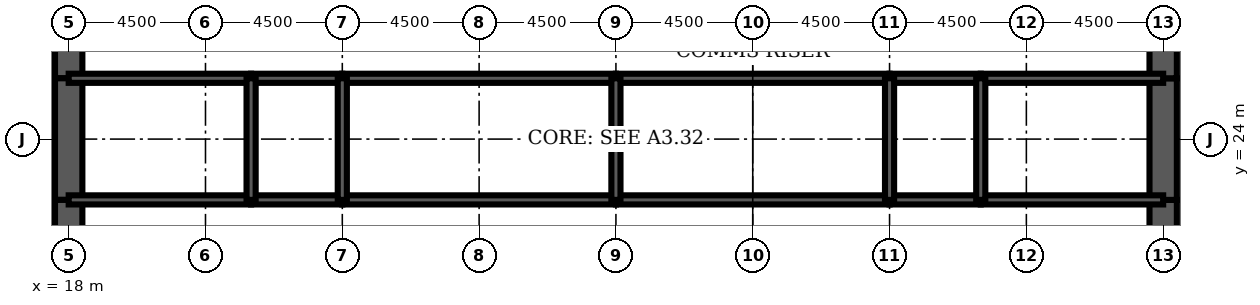
"""IFC4 building model, lengths in metres.
Left out: names, types, materials, properties, quantities, classifications, styles, units other than length and angle.
Written with IfcOpenShell. Run it as: python <this file> out.ifc"""

import sys

from ifc_helpers import new_model, si_unit, direction, frame, frame_2d, origin, place, context, subcontext, project, spatial, rectangle, extrude, element, fill, save


model = new_model("IFC4")
c1 = context("Model", 3, precision=1e-05, world=origin(), true_north=direction((0.0, 1.0)))
c2 = subcontext(c1, "Body", "Model", "MODEL_VIEW")
j1 = project(units=[si_unit("LENGTHUNIT", "METRE"), si_unit("PLANEANGLEUNIT", "RADIAN")], contexts=[c1])
p1 = place(None, origin())
s1 = spatial("IfcSite", under=j1, at=p1, CompositionType="ELEMENT")
p2 = place(p1, origin())
s2 = spatial("IfcBuilding", under=s1, at=p2, CompositionType="ELEMENT")
p3 = place(p2, frame((0.0, 0.0, 138.3)))
s3 = spatial("IfcBuildingStorey", under=s2, at=p3, CompositionType="ELEMENT", Elevation=138.3)
p4 = place(p3, frame((18.0, 28.8, 0.0), z_axis=(0.0, 0.0, 1.0), x_axis=(0.0, -1.0, 0.0)))
e1 = element("IfcWall", 1, at=p4, inside=s3, PredefinedType="SHEAR", context=c2, shape_type="SweptSolid", body=[
    extrude(rectangle(XDim=2.8, YDim=0.9, at=frame_2d((1.4, 0.0))), origin(), (0.0, 0.0, 1.0), 4.2),
])
p5 = place(p4, frame((0.4, 0.0, 0.0)))
e2 = element("IfcOpeningElement", 2, at=p5, cuts=e1, PredefinedType="OPENING", context=c2, shape_type="SweptSolid", body=[
    extrude(rectangle(XDim=1.8, YDim=2.1, at=frame_2d((0.9, 1.05))), frame((0.0, 0.46, 0.0), z_axis=(0.0, -1.0, 0.0), x_axis=(1.0, 0.0, 0.0)), (0.0, 0.0, 1.0), 0.92),
])
p6 = place(p3, frame((18.0, 26.0, 0.0), z_axis=(0.0, 0.0, 1.0), x_axis=(0.0, -1.0, 0.0)))
e3 = element("IfcWall", 3, at=p6, inside=s3, PredefinedType="SHEAR", context=c2, shape_type="SweptSolid", body=[
    extrude(rectangle(XDim=4.0, YDim=0.9, at=frame_2d((2.0, 0.0))), origin(), (0.0, 0.0, 1.0), 4.2),
])
p7 = place(p3, frame((18.0, 22.0, 0.0), z_axis=(0.0, 0.0, 1.0), x_axis=(0.0, -1.0, 0.0)))
e4 = element("IfcWall", 4, at=p7, inside=s3, PredefinedType="SHEAR", context=c2, shape_type="SweptSolid", body=[
    extrude(rectangle(XDim=2.8, YDim=0.9, at=frame_2d((1.4, 0.0))), origin(), (0.0, 0.0, 1.0), 4.2),
])
p8 = place(p7, frame((0.6, 0.0, 0.0)))
e5 = element("IfcOpeningElement", 5, at=p8, cuts=e4, PredefinedType="OPENING", context=c2, shape_type="SweptSolid", body=[
    extrude(rectangle(XDim=1.8, YDim=2.1, at=frame_2d((0.9, 1.05))), frame((0.0, 0.46, 0.0), z_axis=(0.0, -1.0, 0.0), x_axis=(1.0, 0.0, 0.0)), (0.0, 0.0, 1.0), 0.92),
])
p9 = place(p3, frame((54.0, 19.2, 0.0), z_axis=(0.0, 0.0, 1.0), x_axis=(0.0, 1.0, 0.0)))
e6 = element("IfcWall", 6, at=p9, inside=s3, PredefinedType="SHEAR", context=c2, shape_type="SweptSolid", body=[
    extrude(rectangle(XDim=2.8, YDim=0.9, at=frame_2d((1.4, 0.0))), origin(), (0.0, 0.0, 1.0), 4.2),
])
p10 = place(p9, frame((0.4, 0.0, 0.0)))
e7 = element("IfcOpeningElement", 7, at=p10, cuts=e6, PredefinedType="OPENING", context=c2, shape_type="SweptSolid", body=[
    extrude(rectangle(XDim=1.8, YDim=2.1, at=frame_2d((0.9, 1.05))), frame((0.0, 0.46, 0.0), z_axis=(0.0, -1.0, 0.0), x_axis=(1.0, 0.0, 0.0)), (0.0, 0.0, 1.0), 0.92),
])
p11 = place(p3, frame((54.0, 22.0, 0.0), z_axis=(0.0, 0.0, 1.0), x_axis=(0.0, 1.0, 0.0)))
e8 = element("IfcWall", 8, at=p11, inside=s3, PredefinedType="SHEAR", context=c2, shape_type="SweptSolid", body=[
    extrude(rectangle(XDim=4.0, YDim=0.9, at=frame_2d((2.0, 0.0))), origin(), (0.0, 0.0, 1.0), 4.2),
])
p12 = place(p3, frame((54.0, 26.0, 0.0), z_axis=(0.0, 0.0, 1.0), x_axis=(0.0, 1.0, 0.0)))
e9 = element("IfcWall", 9, at=p12, inside=s3, PredefinedType="SHEAR", context=c2, shape_type="SweptSolid", body=[
    extrude(rectangle(XDim=2.8, YDim=0.9, at=frame_2d((1.4, 0.0))), origin(), (0.0, 0.0, 1.0), 4.2),
])
p13 = place(p12, frame((0.6, 0.0, 0.0)))
e10 = element("IfcOpeningElement", 10, at=p13, cuts=e9, PredefinedType="OPENING", context=c2, shape_type="SweptSolid", body=[
    extrude(rectangle(XDim=1.8, YDim=2.1, at=frame_2d((0.9, 1.05))), frame((0.0, 0.46, 0.0), z_axis=(0.0, -1.0, 0.0), x_axis=(1.0, 0.0, 0.0)), (0.0, 0.0, 1.0), 0.92),
])
p14 = place(p3, frame((18.0, 22.0, 0.0), z_axis=(0.0, 0.0, 1.0), x_axis=(1.0, 0.0, 0.0)))
e11 = element("IfcWall", 11, at=p14, inside=s3, PredefinedType="SOLIDWALL", context=c2, shape_type="SweptSolid", body=[
    extrude(rectangle(XDim=6.0, YDim=0.3, at=frame_2d((3.0, 0.0))), origin(), (0.0, 0.0, 1.0), 4.2),
])
p15 = place(p14, frame((4.4, 0.0, 0.0)))
e12 = element("IfcOpeningElement", 12, at=p15, cuts=e11, PredefinedType="OPENING", context=c2, shape_type="SweptSolid", body=[
    extrude(rectangle(XDim=1.0, YDim=2.1, at=frame_2d((0.5, 1.05))), frame((0.0, 0.16, 0.0), z_axis=(0.0, -1.0, 0.0), x_axis=(1.0, 0.0, 0.0)), (0.0, 0.0, 1.0), 0.32),
])
p16 = place(p14, frame((1.0, 0.0, 0.0)))
e13 = element("IfcOpeningElement", 13, at=p16, cuts=e11, PredefinedType="OPENING", context=c2, shape_type="SweptSolid", body=[
    extrude(rectangle(XDim=1.0, YDim=2.1, at=frame_2d((0.5, 1.05))), frame((0.0, 0.16, 0.0), z_axis=(0.0, -1.0, 0.0), x_axis=(1.0, 0.0, 0.0)), (0.0, 0.0, 1.0), 0.32),
])
p17 = place(p3, frame((24.0, 22.0, 0.0), z_axis=(0.0, 0.0, 1.0), x_axis=(1.0, 0.0, 0.0)))
e14 = element("IfcWall", 14, at=p17, inside=s3, PredefinedType="SOLIDWALL", context=c2, shape_type="SweptSolid", body=[
    extrude(rectangle(XDim=3.0, YDim=0.3, at=frame_2d((1.5, 0.0))), origin(), (0.0, 0.0, 1.0), 4.2),
])
p18 = place(p17, frame((1.0, 0.0, 0.0)))
e15 = element("IfcOpeningElement", 15, at=p18, cuts=e14, PredefinedType="OPENING", context=c2, shape_type="SweptSolid", body=[
    extrude(rectangle(XDim=1.0, YDim=2.1, at=frame_2d((0.5, 1.05))), frame((0.0, 0.16, 0.0), z_axis=(0.0, -1.0, 0.0), x_axis=(1.0, 0.0, 0.0)), (0.0, 0.0, 1.0), 0.32),
])
p19 = place(p3, frame((27.0, 22.0, 0.0), z_axis=(0.0, 0.0, 1.0), x_axis=(1.0, 0.0, 0.0)))
e16 = element("IfcWall", 16, at=p19, inside=s3, PredefinedType="SOLIDWALL", context=c2, shape_type="SweptSolid", body=[
    extrude(rectangle(XDim=9.0, YDim=0.3, at=frame_2d((4.5, 0.0))), origin(), (0.0, 0.0, 1.0), 4.2),
])
p20 = place(p19, frame((4.0, 0.0, 0.0)))
e17 = element("IfcOpeningElement", 17, at=p20, cuts=e16, PredefinedType="OPENING", context=c2, shape_type="SweptSolid", body=[
    extrude(rectangle(XDim=1.0, YDim=2.1, at=frame_2d((0.5, 1.05))), frame((0.0, 0.16, 0.0), z_axis=(0.0, -1.0, 0.0), x_axis=(1.0, 0.0, 0.0)), (0.0, 0.0, 1.0), 0.32),
])
p21 = place(p3, frame((36.0, 22.0, 0.0), z_axis=(0.0, 0.0, 1.0), x_axis=(1.0, 0.0, 0.0)))
e18 = element("IfcWall", 18, at=p21, inside=s3, PredefinedType="SOLIDWALL", context=c2, shape_type="SweptSolid", body=[
    extrude(rectangle(XDim=9.0, YDim=0.3, at=frame_2d((4.5, 0.0))), origin(), (0.0, 0.0, 1.0), 4.2),
])
p22 = place(p21, frame((4.0, 0.0, 0.0)))
e19 = element("IfcOpeningElement", 19, at=p22, cuts=e18, PredefinedType="OPENING", context=c2, shape_type="SweptSolid", body=[
    extrude(rectangle(XDim=1.0, YDim=2.1, at=frame_2d((0.5, 1.05))), frame((0.0, 0.16, 0.0), z_axis=(0.0, -1.0, 0.0), x_axis=(1.0, 0.0, 0.0)), (0.0, 0.0, 1.0), 0.32),
])
p23 = place(p3, frame((45.0, 22.0, 0.0), z_axis=(0.0, 0.0, 1.0), x_axis=(1.0, 0.0, 0.0)))
e20 = element("IfcWall", 20, at=p23, inside=s3, PredefinedType="SOLIDWALL", context=c2, shape_type="SweptSolid", body=[
    extrude(rectangle(XDim=3.0, YDim=0.3, at=frame_2d((1.5, 0.0))), origin(), (0.0, 0.0, 1.0), 4.2),
])
p24 = place(p23, frame((1.0, 0.0, 0.0)))
e21 = element("IfcOpeningElement", 21, at=p24, cuts=e20, PredefinedType="OPENING", context=c2, shape_type="SweptSolid", body=[
    extrude(rectangle(XDim=1.0, YDim=2.1, at=frame_2d((0.5, 1.05))), frame((0.0, 0.16, 0.0), z_axis=(0.0, -1.0, 0.0), x_axis=(1.0, 0.0, 0.0)), (0.0, 0.0, 1.0), 0.32),
])
p25 = place(p3, frame((48.0, 22.0, 0.0), z_axis=(0.0, 0.0, 1.0), x_axis=(1.0, 0.0, 0.0)))
e22 = element("IfcWall", 22, at=p25, inside=s3, PredefinedType="SOLIDWALL", context=c2, shape_type="SweptSolid", body=[
    extrude(rectangle(XDim=6.0, YDim=0.3, at=frame_2d((3.0, 0.0))), origin(), (0.0, 0.0, 1.0), 4.2),
])
p26 = place(p25, frame((2.0, 0.0, 0.0)))
e23 = element("IfcOpeningElement", 23, at=p26, cuts=e22, PredefinedType="OPENING", context=c2, shape_type="SweptSolid", body=[
    extrude(rectangle(XDim=1.0, YDim=2.1, at=frame_2d((0.5, 1.05))), frame((0.0, 0.16, 0.0), z_axis=(0.0, -1.0, 0.0), x_axis=(1.0, 0.0, 0.0)), (0.0, 0.0, 1.0), 0.32),
])
p27 = place(p25, frame((4.0, 0.0, 0.0)))
e24 = element("IfcOpeningElement", 24, at=p27, cuts=e22, PredefinedType="OPENING", context=c2, shape_type="SweptSolid", body=[
    extrude(rectangle(XDim=1.0, YDim=2.1, at=frame_2d((0.5, 1.05))), frame((0.0, 0.16, 0.0), z_axis=(0.0, -1.0, 0.0), x_axis=(1.0, 0.0, 0.0)), (0.0, 0.0, 1.0), 0.32),
])
p28 = place(p3, frame((18.0, 26.0, 0.0), z_axis=(0.0, 0.0, 1.0), x_axis=(1.0, 0.0, 0.0)))
e25 = element("IfcWall", 25, at=p28, inside=s3, PredefinedType="SOLIDWALL", context=c2, shape_type="SweptSolid", body=[
    extrude(rectangle(XDim=6.0, YDim=0.3, at=frame_2d((3.0, 0.0))), origin(), (0.0, 0.0, 1.0), 4.2),
])
p29 = place(p3, frame((24.0, 26.0, 0.0), z_axis=(0.0, 0.0, 1.0), x_axis=(1.0, 0.0, 0.0)))
e26 = element("IfcWall", 26, at=p29, inside=s3, PredefinedType="SOLIDWALL", context=c2, shape_type="SweptSolid", body=[
    extrude(rectangle(XDim=3.0, YDim=0.3, at=frame_2d((1.5, 0.0))), origin(), (0.0, 0.0, 1.0), 4.2),
])
for number, where, z_axis, x_axis in (
    (27, (27.0, 26.0, 0.0), (0.0, 0.0, 1.0), (1.0, 0.0, 0.0)),
    (28, (36.0, 26.0, 0.0), (0.0, 0.0, 1.0), (1.0, 0.0, 0.0)),
):
    element("IfcWall", number, at=place(p3, frame(where, z_axis=z_axis, x_axis=x_axis)), inside=s3, PredefinedType="SOLIDWALL", context=c2, shape_type="SweptSolid", body=[
        extrude(rectangle(XDim=9.0, YDim=0.3, at=frame_2d((4.5, 0.0))), origin(), (0.0, 0.0, 1.0), 4.2),
    ])
p30 = place(p3, frame((45.0, 26.0, 0.0), z_axis=(0.0, 0.0, 1.0), x_axis=(1.0, 0.0, 0.0)))
e29 = element("IfcWall", 29, at=p30, inside=s3, PredefinedType="SOLIDWALL", context=c2, shape_type="SweptSolid", body=[
    extrude(rectangle(XDim=3.0, YDim=0.3, at=frame_2d((1.5, 0.0))), origin(), (0.0, 0.0, 1.0), 4.2),
])
p31 = place(p3, frame((48.0, 26.0, 0.0), z_axis=(0.0, 0.0, 1.0), x_axis=(1.0, 0.0, 0.0)))
e30 = element("IfcWall", 30, at=p31, inside=s3, PredefinedType="SOLIDWALL", context=c2, shape_type="SweptSolid", body=[
    extrude(rectangle(XDim=6.0, YDim=0.3, at=frame_2d((3.0, 0.0))), origin(), (0.0, 0.0, 1.0), 4.2),
])
for number, where, z_axis, x_axis in (
    (31, (24.0, 22.0, 0.0), (0.0, 0.0, 1.0), (0.0, 1.0, 0.0)),
    (32, (27.0, 22.0, 0.0), (0.0, 0.0, 1.0), (0.0, 1.0, 0.0)),
    (33, (36.0, 22.0, 0.0), (0.0, 0.0, 1.0), (0.0, 1.0, 0.0)),
    (34, (45.0, 22.0, 0.0), (0.0, 0.0, 1.0), (0.0, 1.0, 0.0)),
    (35, (48.0, 22.0, 0.0), (0.0, 0.0, 1.0), (0.0, 1.0, 0.0)),
):
    element("IfcWall", number, at=place(p3, frame(where, z_axis=z_axis, x_axis=x_axis)), inside=s3, PredefinedType="SOLIDWALL", context=c2, shape_type="SweptSolid", body=[
        extrude(rectangle(XDim=4.0, YDim=0.3, at=frame_2d((2.0, 0.0))), origin(), (0.0, 0.0, 1.0), 4.2),
    ])
p32 = place(p3, frame((39.0, 22.15, 0.0), z_axis=(0.0, 0.0, 1.0), x_axis=(0.0, 1.0, 0.0)))
e36 = element("IfcWall", 36, at=p32, inside=s3, PredefinedType="PARTITIONING", context=c2, shape_type="SweptSolid", body=[
    extrude(rectangle(XDim=3.7, YDim=0.15, at=frame_2d((1.85, 0.0))), origin(), (0.0, 0.0, 1.0), 3.0),
])
p33 = place(p32, frame((2.2, 0.0, 0.0)))
e37 = element("IfcOpeningElement", 37, at=p33, cuts=e36, PredefinedType="OPENING", context=c2, shape_type="SweptSolid", body=[
    extrude(rectangle(XDim=1.0, YDim=2.1, at=frame_2d((0.5, 1.05))), frame((0.0, 0.085, 0.0), z_axis=(0.0, -1.0, 0.0), x_axis=(1.0, 0.0, 0.0)), (0.0, 0.0, 1.0), 0.17),
])
for number, where, z_axis, x_axis in (
    (38, (20.625, 22.15, 0.0), (0.0, 0.0, 1.0), (0.0, 1.0, 0.0)),
    (39, (51.375, 22.15, 0.0), (0.0, 0.0, 1.0), (0.0, 1.0, 0.0)),
):
    element("IfcWall", number, at=place(p3, frame(where, z_axis=z_axis, x_axis=x_axis)), inside=s3, PredefinedType="PARTITIONING", context=c2, shape_type="SweptSolid", body=[
        extrude(rectangle(XDim=3.7, YDim=0.15, at=frame_2d((1.85, 0.0))), origin(), (0.0, 0.0, 1.0), 3.0),
    ])
p34 = place(p33, origin())
e40 = element("IfcDoor", 40, at=p34, inside=s3, OperationType="SINGLE_SWING_RIGHT", PredefinedType="DOOR", context=c2, shape_type="SweptSolid", body=[
    extrude(rectangle(XDim=1.0, YDim=2.1, at=frame_2d((0.5, 1.05))), frame((0.0, 0.025, 0.0), z_axis=(0.0, -1.0, 0.0), x_axis=(1.0, 0.0, 0.0)), (0.0, 0.0, 1.0), 0.05),
])
fill(e37, e40)
p35 = place(p8, origin())
e41 = element("IfcDoor", 41, at=p35, inside=s3, OperationType="SINGLE_SWING_LEFT", PredefinedType="DOOR", context=c2, shape_type="SweptSolid", body=[
    extrude(rectangle(XDim=1.8, YDim=2.1, at=frame_2d((0.9, 1.05))), frame((0.0, 0.45, 0.0), z_axis=(0.0, -1.0, 0.0), x_axis=(1.0, 0.0, 0.0)), (0.0, 0.0, 1.0), 0.899),
])
fill(e5, e41)
p36 = place(p5, origin())
e42 = element("IfcDoor", 42, at=p36, inside=s3, OperationType="SINGLE_SWING_LEFT", PredefinedType="DOOR", context=c2, shape_type="SweptSolid", body=[
    extrude(rectangle(XDim=1.8, YDim=2.1, at=frame_2d((0.9, 1.05))), frame((0.0, 0.45, 0.0), z_axis=(0.0, -1.0, 0.0), x_axis=(1.0, 0.0, 0.0)), (0.0, 0.0, 1.0), 0.899),
])
fill(e2, e42)
p37 = place(p10, origin())
e43 = element("IfcDoor", 43, at=p37, inside=s3, OperationType="SINGLE_SWING_LEFT", PredefinedType="DOOR", context=c2, shape_type="SweptSolid", body=[
    extrude(rectangle(XDim=1.8, YDim=2.1, at=frame_2d((0.9, 1.05))), frame((0.0, 0.45, 0.0), z_axis=(0.0, -1.0, 0.0), x_axis=(1.0, 0.0, 0.0)), (0.0, 0.0, 1.0), 0.899),
])
fill(e7, e43)
p38 = place(p13, origin())
e44 = element("IfcDoor", 44, at=p38, inside=s3, OperationType="SINGLE_SWING_LEFT", PredefinedType="DOOR", context=c2, shape_type="SweptSolid", body=[
    extrude(rectangle(XDim=1.8, YDim=2.1, at=frame_2d((0.9, 1.05))), frame((0.0, 0.45, 0.0), z_axis=(0.0, -1.0, 0.0), x_axis=(1.0, 0.0, 0.0)), (0.0, 0.0, 1.0), 0.899),
])
fill(e10, e44)
p39 = place(p15, origin())
e45 = element("IfcDoor", 45, at=p39, inside=s3, OperationType="SINGLE_SWING_RIGHT", PredefinedType="DOOR", context=c2, shape_type="SweptSolid", body=[
    extrude(rectangle(XDim=1.0, YDim=2.1, at=frame_2d((0.5, 1.05))), frame((0.0, 0.025, 0.0), z_axis=(0.0, -1.0, 0.0), x_axis=(1.0, 0.0, 0.0)), (0.0, 0.0, 1.0), 0.05),
])
fill(e12, e45)
p40 = place(p18, origin())
e46 = element("IfcDoor", 46, at=p40, inside=s3, OperationType="SINGLE_SWING_LEFT", PredefinedType="DOOR", context=c2, shape_type="SweptSolid", body=[
    extrude(rectangle(XDim=1.0, YDim=2.1, at=frame_2d((0.5, 1.05))), frame((0.0, 0.025, 0.0), z_axis=(0.0, -1.0, 0.0), x_axis=(1.0, 0.0, 0.0)), (0.0, 0.0, 1.0), 0.05),
])
fill(e15, e46)
p41 = place(p20, origin())
e47 = element("IfcDoor", 47, at=p41, inside=s3, OperationType="SINGLE_SWING_LEFT", PredefinedType="DOOR", context=c2, shape_type="SweptSolid", body=[
    extrude(rectangle(XDim=1.0, YDim=2.1, at=frame_2d((0.5, 1.05))), frame((0.0, 0.025, 0.0), z_axis=(0.0, -1.0, 0.0), x_axis=(1.0, 0.0, 0.0)), (0.0, 0.0, 1.0), 0.05),
])
fill(e17, e47)
p42 = place(p22, origin())
e48 = element("IfcDoor", 48, at=p42, inside=s3, OperationType="SINGLE_SWING_LEFT", PredefinedType="DOOR", context=c2, shape_type="SweptSolid", body=[
    extrude(rectangle(XDim=1.0, YDim=2.1, at=frame_2d((0.5, 1.05))), frame((0.0, 0.025, 0.0), z_axis=(0.0, -1.0, 0.0), x_axis=(1.0, 0.0, 0.0)), (0.0, 0.0, 1.0), 0.05),
])
fill(e19, e48)
p43 = place(p24, origin())
e49 = element("IfcDoor", 49, at=p43, inside=s3, OperationType="SINGLE_SWING_LEFT", PredefinedType="DOOR", context=c2, shape_type="SweptSolid", body=[
    extrude(rectangle(XDim=1.0, YDim=2.1, at=frame_2d((0.5, 1.05))), frame((0.0, 0.025, 0.0), z_axis=(0.0, -1.0, 0.0), x_axis=(1.0, 0.0, 0.0)), (0.0, 0.0, 1.0), 0.05),
])
fill(e21, e49)
p44 = place(p26, origin())
e50 = element("IfcDoor", 50, at=p44, inside=s3, OperationType="SINGLE_SWING_LEFT", PredefinedType="DOOR", context=c2, shape_type="SweptSolid", body=[
    extrude(rectangle(XDim=1.0, YDim=2.1, at=frame_2d((0.5, 1.05))), frame((0.0, 0.025, 0.0), z_axis=(0.0, -1.0, 0.0), x_axis=(1.0, 0.0, 0.0)), (0.0, 0.0, 1.0), 0.05),
])
fill(e23, e50)
p45 = place(p16, origin())
e51 = element("IfcDoor", 51, at=p45, inside=s3, OperationType="SINGLE_SWING_LEFT", PredefinedType="DOOR", context=c2, shape_type="SweptSolid", body=[
    extrude(rectangle(XDim=1.0, YDim=2.1, at=frame_2d((0.5, 1.05))), frame((0.0, 0.025, 0.0), z_axis=(0.0, -1.0, 0.0), x_axis=(1.0, 0.0, 0.0)), (0.0, 0.0, 1.0), 0.05),
])
fill(e13, e51)
p46 = place(p27, origin())
e52 = element("IfcDoor", 52, at=p46, inside=s3, OperationType="SINGLE_SWING_RIGHT", PredefinedType="DOOR", context=c2, shape_type="SweptSolid", body=[
    extrude(rectangle(XDim=1.0, YDim=2.1, at=frame_2d((0.5, 1.05))), frame((0.0, 0.025, 0.0), z_axis=(0.0, -1.0, 0.0), x_axis=(1.0, 0.0, 0.0)), (0.0, 0.0, 1.0), 0.05),
])
fill(e24, e52)
save(model, sys.argv[1])
